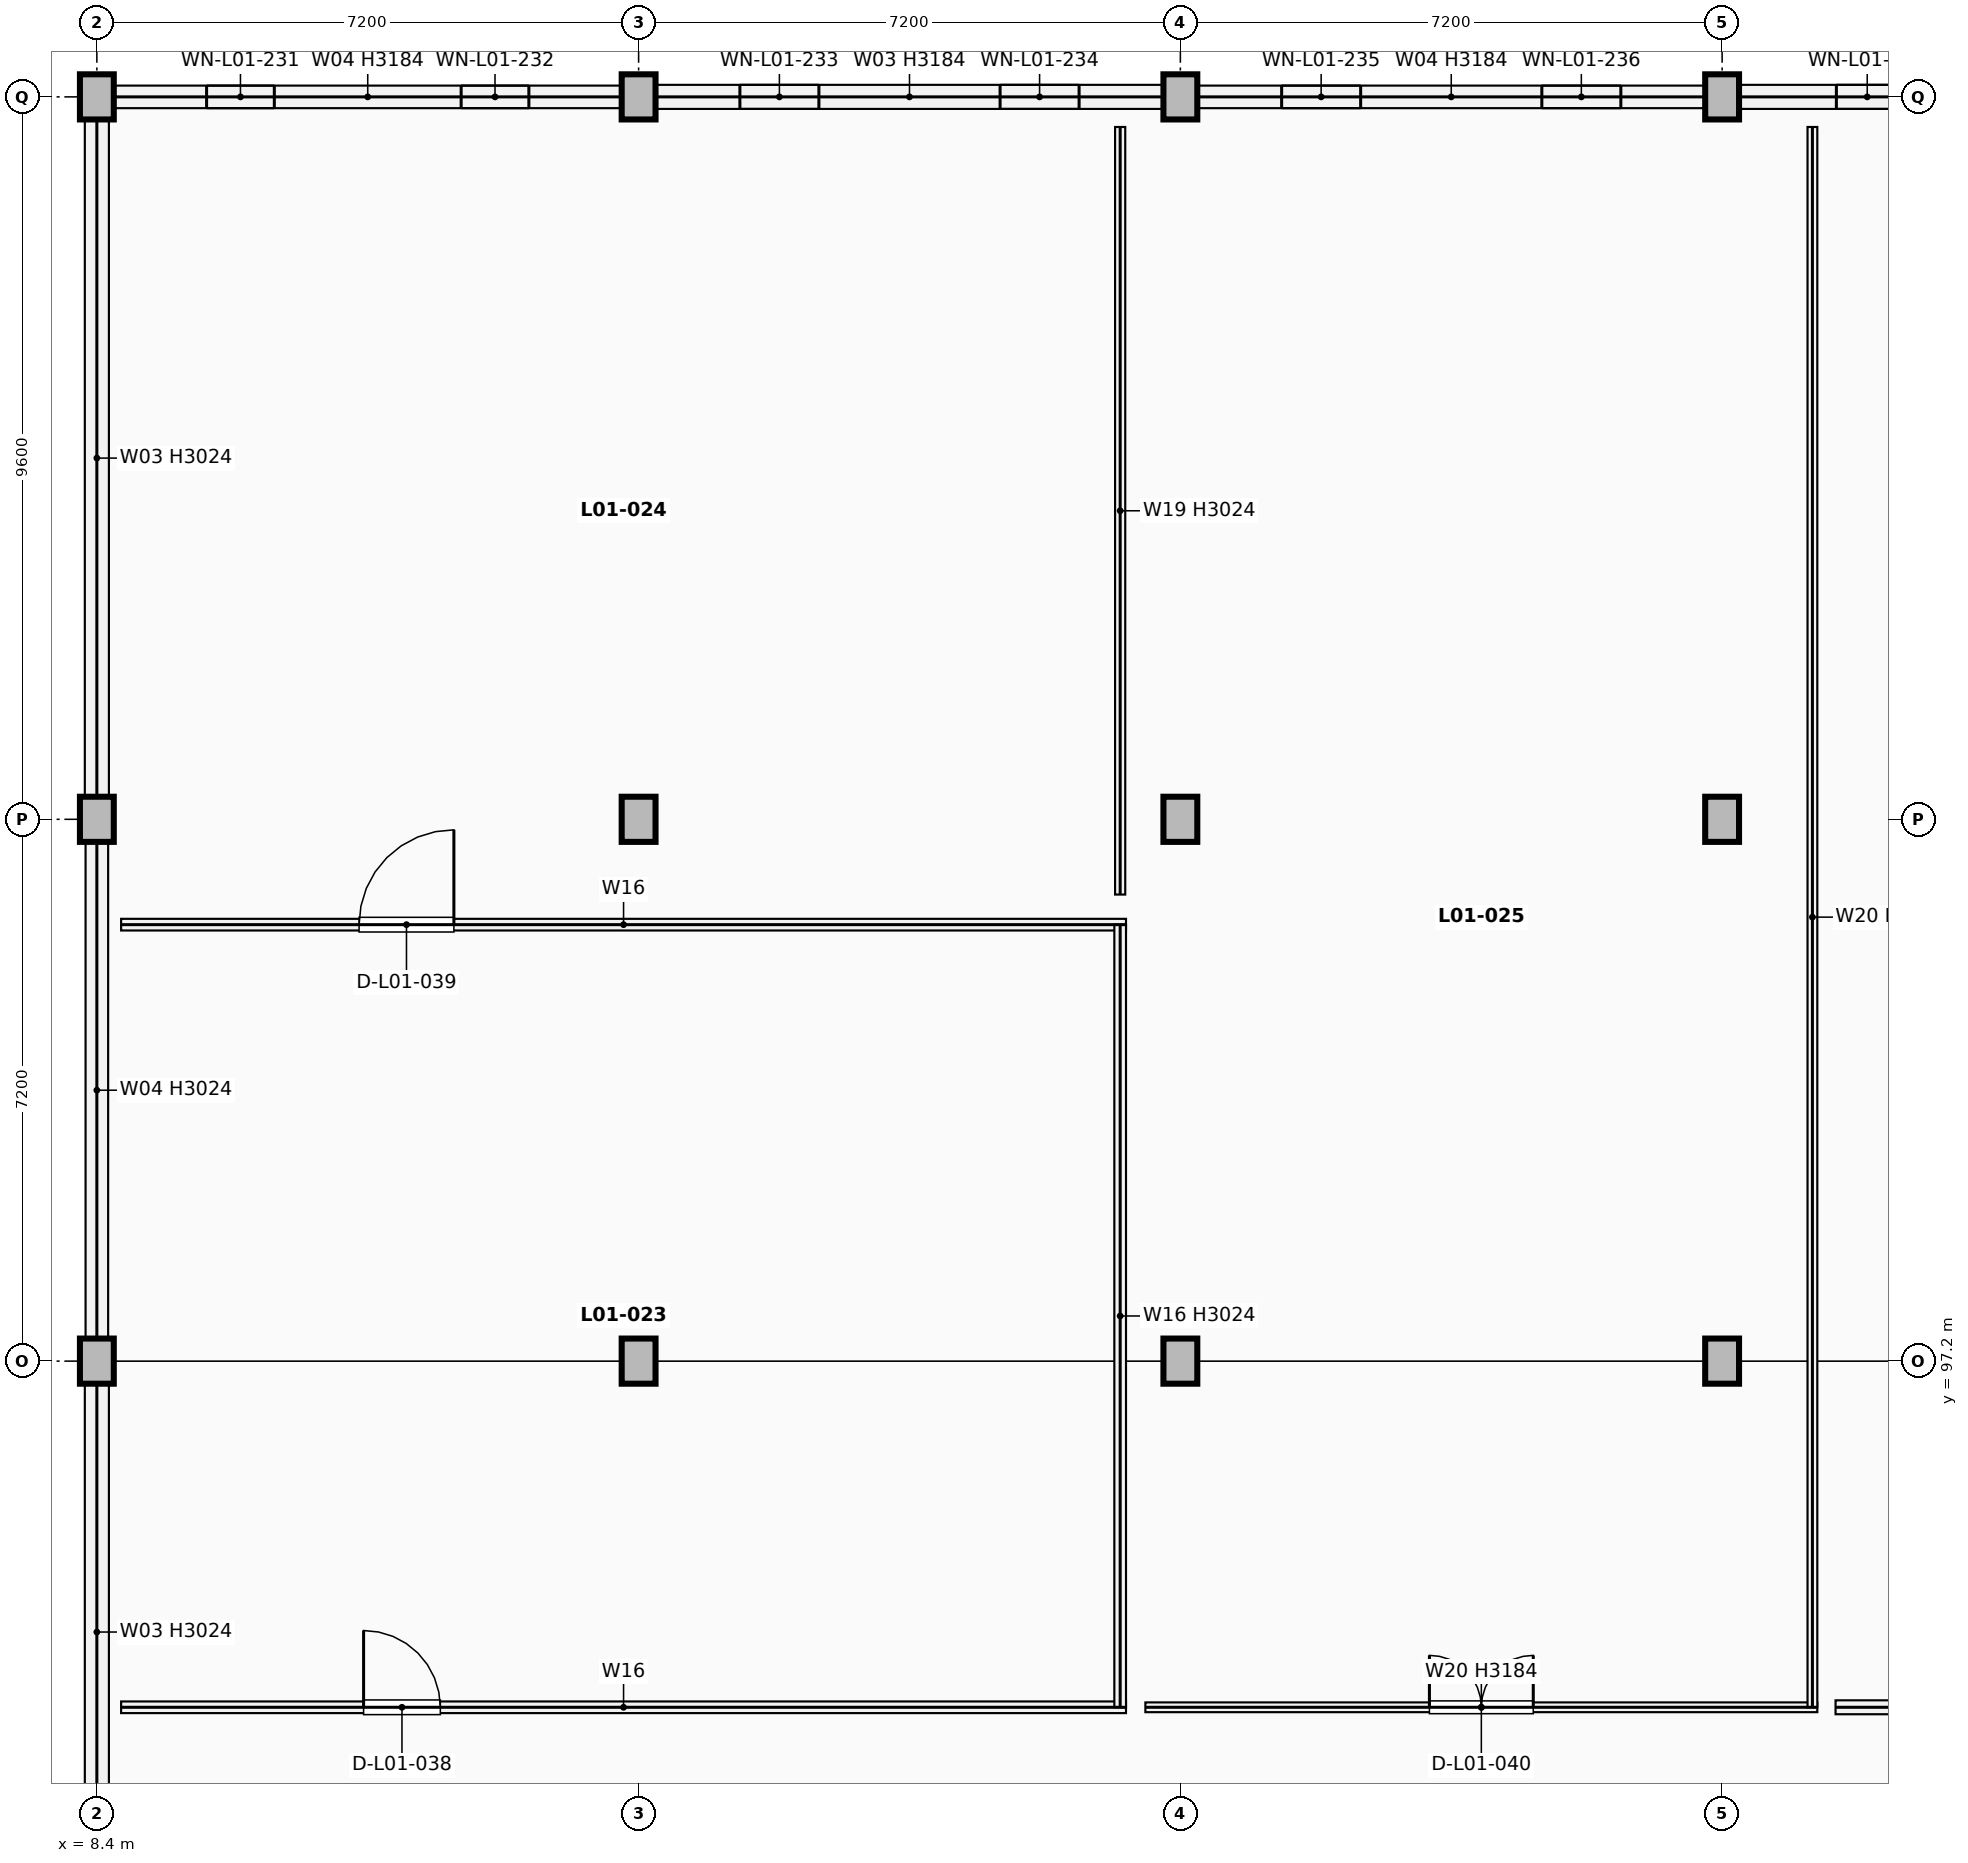
"""IFC4 building model, lengths in metres.
Left out: names, types, materials, properties, quantities, classifications, styles, units other than length and angle.
Written with IfcOpenShell. Run it as: python <this file> out.ifc"""

import sys

from ifc_helpers import new_model, si_unit, direction, frame, frame_2d, origin, origin_2d, place, context, subcontext, project, spatial, rectangle, extrude, element, fill, save


model = new_model("IFC4")
c1 = context("Model", 3, precision=1e-05, world=origin(), true_north=direction((0.0, 1.0)))
c2 = subcontext(c1, "Body", "Model", "MODEL_VIEW")
j1 = project(units=[si_unit("LENGTHUNIT", "METRE"), si_unit("PLANEANGLEUNIT", "RADIAN")], contexts=[c1])
p1 = place(None, origin())
s1 = spatial("IfcSite", under=j1, at=p1, CompositionType="ELEMENT")
p2 = place(p1, origin())
s2 = spatial("IfcBuilding", under=s1, at=p2, CompositionType="ELEMENT")
p3 = place(p2, frame((0.0, 0.0, 5.1)))
s3 = spatial("IfcBuildingStorey", under=s2, at=p3, CompositionType="ELEMENT", Elevation=5.1)
for number, where, z_axis, x_axis in (
    (1, (8.4, 97.2, 0.0), (0.0, 0.0, 1.0), (1.0, 0.0, 0.0)),
    (2, (8.4, 104.4, 0.0), (0.0, 0.0, 1.0), (1.0, 0.0, 0.0)),
    (3, (8.4, 114.0, 0.0), (0.0, 0.0, 1.0), (1.0, 0.0, 0.0)),
    (4, (15.6, 97.2, 0.0), (0.0, 0.0, 1.0), (1.0, 0.0, 0.0)),
    (5, (15.6, 104.4, 0.0), (0.0, 0.0, 1.0), (1.0, 0.0, 0.0)),
    (6, (15.6, 114.0, 0.0), (0.0, 0.0, 1.0), (1.0, 0.0, 0.0)),
    (7, (22.8, 97.2, 0.0), (0.0, 0.0, 1.0), (1.0, 0.0, 0.0)),
    (8, (22.8, 104.4, 0.0), (0.0, 0.0, 1.0), (1.0, 0.0, 0.0)),
    (9, (22.8, 114.0, 0.0), (0.0, 0.0, 1.0), (1.0, 0.0, 0.0)),
    (10, (30.0, 97.2, 0.0), (0.0, 0.0, 1.0), (1.0, 0.0, 0.0)),
    (11, (30.0, 104.4, 0.0), (0.0, 0.0, 1.0), (1.0, 0.0, 0.0)),
    (12, (30.0, 114.0, 0.0), (0.0, 0.0, 1.0), (1.0, 0.0, 0.0)),
):
    element("IfcColumn", number, at=place(p3, frame(where, z_axis=z_axis, x_axis=x_axis)), inside=s3, PredefinedType="COLUMN", context=c2, shape_type="SweptSolid", body=[
        extrude(rectangle(XDim=0.45, YDim=0.6, at=origin_2d()), origin(), (0.0, 0.0, 1.0), 4.42),
    ])
p4 = place(p3, frame((8.4, 90.302, 0.0), z_axis=(0.0, 0.0, 1.0), x_axis=(0.0, 1.0, 0.0)))
e13 = element("IfcWall", 13, at=p4, inside=s3, PredefinedType="SOLIDWALL", context=c2, shape_type="SweptSolid", body=[
    extrude(rectangle(XDim=6.596, YDim=0.32, at=frame_2d((3.298, 0.0))), origin(), (0.0, 0.0, 1.0), 3.024),
])
p5 = place(p3, frame((8.4, 97.502, 0.0), z_axis=(0.0, 0.0, 1.0), x_axis=(0.0, 1.0, 0.0)))
e14 = element("IfcWall", 14, at=p5, inside=s3, PredefinedType="SOLIDWALL", context=c2, shape_type="SweptSolid", body=[
    extrude(rectangle(XDim=6.596, YDim=0.3, at=frame_2d((3.298, 0.0))), origin(), (0.0, 0.0, 1.0), 3.024),
])
p6 = place(p3, frame((8.4, 104.702, 0.0), z_axis=(0.0, 0.0, 1.0), x_axis=(0.0, 1.0, 0.0)))
e15 = element("IfcWall", 15, at=p6, inside=s3, PredefinedType="SOLIDWALL", context=c2, shape_type="SweptSolid", body=[
    extrude(rectangle(XDim=8.996, YDim=0.32, at=frame_2d((4.498, 0.0))), origin(), (0.0, 0.0, 1.0), 3.024),
])
p7 = place(p3, frame((8.627, 114.0, 0.0), z_axis=(0.0, 0.0, 1.0), x_axis=(1.0, 0.0, 0.0)))
e16 = element("IfcWall", 16, at=p7, inside=s3, PredefinedType="SOLIDWALL", context=c2, shape_type="SweptSolid", body=[
    extrude(rectangle(XDim=6.746, YDim=0.3, at=frame_2d((3.373, 0.0))), origin(), (0.0, 0.0, 1.0), 3.184),
])
p8 = place(p7, frame((1.231, 0.0, 0.75)))
e17 = element("IfcOpeningElement", 17, at=p8, cuts=e16, PredefinedType="OPENING", context=c2, shape_type="SweptSolid", body=[
    extrude(rectangle(XDim=0.9, YDim=1.55, at=frame_2d((0.45, 0.775))), frame((0.0, 0.16, 0.0), z_axis=(0.0, -1.0, 0.0), x_axis=(1.0, 0.0, 0.0)), (0.0, 0.0, 1.0), 0.32),
])
p9 = place(p7, frame((4.615, 0.0, 0.75)))
e18 = element("IfcOpeningElement", 18, at=p9, cuts=e16, PredefinedType="OPENING", context=c2, shape_type="SweptSolid", body=[
    extrude(rectangle(XDim=0.9, YDim=1.55, at=frame_2d((0.45, 0.775))), frame((0.0, 0.16, 0.0), z_axis=(0.0, -1.0, 0.0), x_axis=(1.0, 0.0, 0.0)), (0.0, 0.0, 1.0), 0.32),
])
p10 = place(p3, frame((15.827, 114.0, 0.0), z_axis=(0.0, 0.0, 1.0), x_axis=(1.0, 0.0, 0.0)))
e19 = element("IfcWall", 19, at=p10, inside=s3, PredefinedType="SOLIDWALL", context=c2, shape_type="SweptSolid", body=[
    extrude(rectangle(XDim=6.746, YDim=0.32, at=frame_2d((3.373, 0.0))), origin(), (0.0, 0.0, 1.0), 3.184),
])
p11 = place(p10, frame((1.119, 0.0, 0.75)))
e20 = element("IfcOpeningElement", 20, at=p11, cuts=e19, PredefinedType="OPENING", context=c2, shape_type="SweptSolid", body=[
    extrude(rectangle(XDim=1.05, YDim=2.1, at=frame_2d((0.525, 1.05))), frame((0.0, 0.17, 0.0), z_axis=(0.0, -1.0, 0.0), x_axis=(1.0, 0.0, 0.0)), (0.0, 0.0, 1.0), 0.34),
])
p12 = place(p10, frame((4.577, 0.0, 0.75)))
e21 = element("IfcOpeningElement", 21, at=p12, cuts=e19, PredefinedType="OPENING", context=c2, shape_type="SweptSolid", body=[
    extrude(rectangle(XDim=1.05, YDim=2.1, at=frame_2d((0.525, 1.05))), frame((0.0, 0.17, 0.0), z_axis=(0.0, -1.0, 0.0), x_axis=(1.0, 0.0, 0.0)), (0.0, 0.0, 1.0), 0.34),
])
p13 = place(p3, frame((23.027, 114.0, 0.0), z_axis=(0.0, 0.0, 1.0), x_axis=(1.0, 0.0, 0.0)))
e22 = element("IfcWall", 22, at=p13, inside=s3, PredefinedType="SOLIDWALL", context=c2, shape_type="SweptSolid", body=[
    extrude(rectangle(XDim=6.746, YDim=0.3, at=frame_2d((3.373, 0.0))), origin(), (0.0, 0.0, 1.0), 3.184),
])
p14 = place(p13, frame((1.119, 0.0, 0.75)))
e23 = element("IfcOpeningElement", 23, at=p14, cuts=e22, PredefinedType="OPENING", context=c2, shape_type="SweptSolid", body=[
    extrude(rectangle(XDim=1.05, YDim=1.7, at=frame_2d((0.525, 0.85))), frame((0.0, 0.16, 0.0), z_axis=(0.0, -1.0, 0.0), x_axis=(1.0, 0.0, 0.0)), (0.0, 0.0, 1.0), 0.32),
])
p15 = place(p13, frame((4.577, 0.0, 0.75)))
e24 = element("IfcOpeningElement", 24, at=p15, cuts=e22, PredefinedType="OPENING", context=c2, shape_type="SweptSolid", body=[
    extrude(rectangle(XDim=1.05, YDim=1.7, at=frame_2d((0.525, 0.85))), frame((0.0, 0.16, 0.0), z_axis=(0.0, -1.0, 0.0), x_axis=(1.0, 0.0, 0.0)), (0.0, 0.0, 1.0), 0.32),
])
p16 = place(p3, frame((30.227, 114.0, 0.0), z_axis=(0.0, 0.0, 1.0), x_axis=(1.0, 0.0, 0.0)))
e25 = element("IfcWall", 25, at=p16, inside=s3, PredefinedType="SOLIDWALL", context=c2, shape_type="SweptSolid", body=[
    extrude(rectangle(XDim=6.746, YDim=0.32, at=frame_2d((3.373, 0.0))), origin(), (0.0, 0.0, 1.0), 3.184),
])
p17 = place(p16, frame((1.292, 0.0, 0.75)))
e26 = element("IfcOpeningElement", 26, at=p17, cuts=e25, PredefinedType="OPENING", context=c2, shape_type="SweptSolid", body=[
    extrude(rectangle(XDim=0.82, YDim=2.22, at=frame_2d((0.41, 1.11))), frame((0.0, 0.17, 0.0), z_axis=(0.0, -1.0, 0.0), x_axis=(1.0, 0.0, 0.0)), (0.0, 0.0, 1.0), 0.34),
])
p18 = place(p16, frame((4.635, 0.0, 0.75)))
e27 = element("IfcOpeningElement", 27, at=p18, cuts=e25, PredefinedType="OPENING", context=c2, shape_type="SweptSolid", body=[
    extrude(rectangle(XDim=0.82, YDim=2.22, at=frame_2d((0.41, 1.11))), frame((0.0, 0.17, 0.0), z_axis=(0.0, -1.0, 0.0), x_axis=(1.0, 0.0, 0.0)), (0.0, 0.0, 1.0), 0.34),
])
p19 = place(p3, frame((8.722, 92.6, 0.0), z_axis=(0.0, 0.0, 1.0), x_axis=(1.0, 0.0, 0.0)))
e28 = element("IfcWall", 28, at=p19, inside=s3, PredefinedType="PARTITIONING", context=c2, shape_type="SweptSolid", body=[
    extrude(rectangle(XDim=13.355, YDim=0.155, at=frame_2d((6.677, 0.0))), origin(), (0.0, 0.0, 1.0), 3.184),
])
p20 = place(p19, frame((3.222, 0.0, 0.0)))
e29 = element("IfcOpeningElement", 29, at=p20, cuts=e28, PredefinedType="OPENING", context=c2, shape_type="SweptSolid", body=[
    extrude(rectangle(XDim=1.02, YDim=2.18, at=frame_2d((0.51, 1.09))), frame((0.0, 0.087, 0.0), z_axis=(0.0, -1.0, 0.0), x_axis=(1.0, 0.0, 0.0)), (0.0, 0.0, 1.0), 0.175),
])
p21 = place(p3, frame((8.722, 103.0, 0.0), z_axis=(0.0, 0.0, 1.0), x_axis=(1.0, 0.0, 0.0)))
e30 = element("IfcWall", 30, at=p21, inside=s3, PredefinedType="PARTITIONING", context=c2, shape_type="SweptSolid", body=[
    extrude(rectangle(XDim=13.355, YDim=0.155, at=frame_2d((6.677, 0.0))), origin(), (0.0, 0.0, 1.0), 3.184),
])
p22 = place(p21, frame((3.163, 0.0, 0.0)))
e31 = element("IfcOpeningElement", 31, at=p22, cuts=e30, PredefinedType="OPENING", context=c2, shape_type="SweptSolid", body=[
    extrude(rectangle(XDim=1.26, YDim=2.26, at=frame_2d((0.63, 1.13))), frame((0.0, 0.087, 0.0), z_axis=(0.0, -1.0, 0.0), x_axis=(1.0, 0.0, 0.0)), (0.0, 0.0, 1.0), 0.175),
])
p23 = place(p3, frame((22.0, 92.6, 0.0), z_axis=(0.0, 0.0, 1.0), x_axis=(0.0, 1.0, 0.0)))
e32 = element("IfcWall", 32, at=p23, inside=s3, PredefinedType="PARTITIONING", context=c2, shape_type="SweptSolid", body=[
    extrude(rectangle(XDim=10.4, YDim=0.155, at=frame_2d((5.2, 0.0))), origin(), (0.0, 0.0, 1.0), 3.024),
])
p24 = place(p3, frame((22.0, 103.4, 0.0), z_axis=(0.0, 0.0, 1.0), x_axis=(0.0, 1.0, 0.0)))
e33 = element("IfcWall", 33, at=p24, inside=s3, PredefinedType="PARTITIONING", context=c2, shape_type="SweptSolid", body=[
    extrude(rectangle(XDim=10.2, YDim=0.135, at=frame_2d((5.1, 0.0))), origin(), (0.0, 0.0, 1.0), 3.024),
])
p25 = place(p3, frame((22.335, 92.6, 0.0), z_axis=(0.0, 0.0, 1.0), x_axis=(1.0, 0.0, 0.0)))
e34 = element("IfcWall", 34, at=p25, inside=s3, PredefinedType="PARTITIONING", context=c2, shape_type="SweptSolid", body=[
    extrude(rectangle(XDim=8.93, YDim=0.13, at=frame_2d((4.465, 0.0))), origin(), (0.0, 0.0, 1.0), 3.184),
])
p26 = place(p25, frame((3.775, 0.0, 0.0)))
e35 = element("IfcOpeningElement", 35, at=p26, cuts=e34, PredefinedType="OPENING", context=c2, shape_type="SweptSolid", body=[
    extrude(rectangle(XDim=1.38, YDim=2.28, at=frame_2d((0.69, 1.14))), frame((0.0, 0.075, 0.0), z_axis=(0.0, -1.0, 0.0), x_axis=(1.0, 0.0, 0.0)), (0.0, 0.0, 1.0), 0.15),
])
p27 = place(p3, frame((31.2, 92.6, 0.0), z_axis=(0.0, 0.0, 1.0), x_axis=(0.0, 1.0, 0.0)))
e36 = element("IfcWall", 36, at=p27, inside=s3, PredefinedType="PARTITIONING", context=c2, shape_type="SweptSolid", body=[
    extrude(rectangle(XDim=21.0, YDim=0.13, at=frame_2d((10.5, 0.0))), origin(), (0.0, 0.0, 1.0), 3.024),
])
p28 = place(p3, frame((31.508, 92.6, 0.0), z_axis=(0.0, 0.0, 1.0), x_axis=(1.0, 0.0, 0.0)))
e37 = element("IfcWall", 37, at=p28, inside=s3, PredefinedType="PARTITIONING", context=c2, shape_type="SweptSolid", body=[
    extrude(rectangle(XDim=8.785, YDim=0.185, at=frame_2d((4.393, 0.0))), origin(), (0.0, 0.0, 1.0), 3.294),
])
p29 = place(p28, frame((2.08, 0.0, 0.0)))
e38 = element("IfcOpeningElement", 38, at=p29, cuts=e37, PredefinedType="OPENING", context=c2, shape_type="SweptSolid", body=[
    extrude(rectangle(XDim=1.05, YDim=2.15, at=frame_2d((0.525, 1.075))), frame((0.0, 0.103, 0.0), z_axis=(0.0, -1.0, 0.0), x_axis=(1.0, 0.0, 0.0)), (0.0, 0.0, 1.0), 0.205),
])
p30 = place(p8, origin())
e39 = element("IfcWindow", 39, at=p30, inside=s3, PartitioningType="SINGLE_PANEL", PredefinedType="WINDOW", context=c2, shape_type="SweptSolid", body=[
    extrude(rectangle(XDim=0.9, YDim=1.55, at=frame_2d((0.45, 0.775))), frame((0.0, 0.03, 0.0), z_axis=(0.0, -1.0, 0.0), x_axis=(1.0, 0.0, 0.0)), (0.0, 0.0, 1.0), 0.06),
])
fill(e17, e39)
p31 = place(p9, origin())
e40 = element("IfcWindow", 40, at=p31, inside=s3, PartitioningType="SINGLE_PANEL", PredefinedType="WINDOW", context=c2, shape_type="SweptSolid", body=[
    extrude(rectangle(XDim=0.9, YDim=1.55, at=frame_2d((0.45, 0.775))), frame((0.0, 0.03, 0.0), z_axis=(0.0, -1.0, 0.0), x_axis=(1.0, 0.0, 0.0)), (0.0, 0.0, 1.0), 0.06),
])
fill(e18, e40)
p32 = place(p11, origin())
e41 = element("IfcWindow", 41, at=p32, inside=s3, PartitioningType="SINGLE_PANEL", PredefinedType="WINDOW", context=c2, shape_type="SweptSolid", body=[
    extrude(rectangle(XDim=1.05, YDim=2.1, at=frame_2d((0.525, 1.05))), frame((0.0, 0.03, 0.0), z_axis=(0.0, -1.0, 0.0), x_axis=(1.0, 0.0, 0.0)), (0.0, 0.0, 1.0), 0.06),
])
fill(e20, e41)
p33 = place(p12, origin())
e42 = element("IfcWindow", 42, at=p33, inside=s3, PartitioningType="SINGLE_PANEL", PredefinedType="WINDOW", context=c2, shape_type="SweptSolid", body=[
    extrude(rectangle(XDim=1.05, YDim=2.1, at=frame_2d((0.525, 1.05))), frame((0.0, 0.03, 0.0), z_axis=(0.0, -1.0, 0.0), x_axis=(1.0, 0.0, 0.0)), (0.0, 0.0, 1.0), 0.06),
])
fill(e21, e42)
p34 = place(p14, origin())
e43 = element("IfcWindow", 43, at=p34, inside=s3, PartitioningType="SINGLE_PANEL", PredefinedType="WINDOW", context=c2, shape_type="SweptSolid", body=[
    extrude(rectangle(XDim=1.05, YDim=1.7, at=frame_2d((0.525, 0.85))), frame((0.0, 0.03, 0.0), z_axis=(0.0, -1.0, 0.0), x_axis=(1.0, 0.0, 0.0)), (0.0, 0.0, 1.0), 0.06),
])
fill(e23, e43)
p35 = place(p15, origin())
e44 = element("IfcWindow", 44, at=p35, inside=s3, PartitioningType="SINGLE_PANEL", PredefinedType="WINDOW", context=c2, shape_type="SweptSolid", body=[
    extrude(rectangle(XDim=1.05, YDim=1.7, at=frame_2d((0.525, 0.85))), frame((0.0, 0.03, 0.0), z_axis=(0.0, -1.0, 0.0), x_axis=(1.0, 0.0, 0.0)), (0.0, 0.0, 1.0), 0.06),
])
fill(e24, e44)
p36 = place(p17, origin())
e45 = element("IfcWindow", 45, at=p36, inside=s3, PartitioningType="SINGLE_PANEL", PredefinedType="WINDOW", context=c2, shape_type="SweptSolid", body=[
    extrude(rectangle(XDim=0.82, YDim=2.22, at=frame_2d((0.41, 1.11))), frame((0.0, 0.03, 0.0), z_axis=(0.0, -1.0, 0.0), x_axis=(1.0, 0.0, 0.0)), (0.0, 0.0, 1.0), 0.06),
])
fill(e26, e45)
p37 = place(p20, origin())
e46 = element("IfcDoor", 46, at=p37, inside=s3, OperationType="SINGLE_SWING_LEFT", PredefinedType="DOOR", context=c2, shape_type="SweptSolid", body=[
    extrude(rectangle(XDim=1.02, YDim=2.18, at=frame_2d((0.51, 1.09))), frame((0.0, 0.025, 0.0), z_axis=(0.0, -1.0, 0.0), x_axis=(1.0, 0.0, 0.0)), (0.0, 0.0, 1.0), 0.05),
])
fill(e29, e46)
p38 = place(p22, origin())
e47 = element("IfcDoor", 47, at=p38, inside=s3, OperationType="SINGLE_SWING_RIGHT", PredefinedType="DOOR", context=c2, shape_type="SweptSolid", body=[
    extrude(rectangle(XDim=1.26, YDim=2.26, at=frame_2d((0.63, 1.13))), frame((0.0, 0.025, 0.0), z_axis=(0.0, -1.0, 0.0), x_axis=(1.0, 0.0, 0.0)), (0.0, 0.0, 1.0), 0.05),
])
fill(e31, e47)
p39 = place(p26, origin())
e48 = element("IfcDoor", 48, at=p39, inside=s3, OperationType="DOUBLE_DOOR_SINGLE_SWING", PredefinedType="DOOR", context=c2, shape_type="SweptSolid", body=[
    extrude(rectangle(XDim=1.38, YDim=2.28, at=frame_2d((0.69, 1.14))), frame((0.0, 0.025, 0.0), z_axis=(0.0, -1.0, 0.0), x_axis=(1.0, 0.0, 0.0)), (0.0, 0.0, 1.0), 0.05),
])
fill(e35, e48)
save(model, sys.argv[1])
